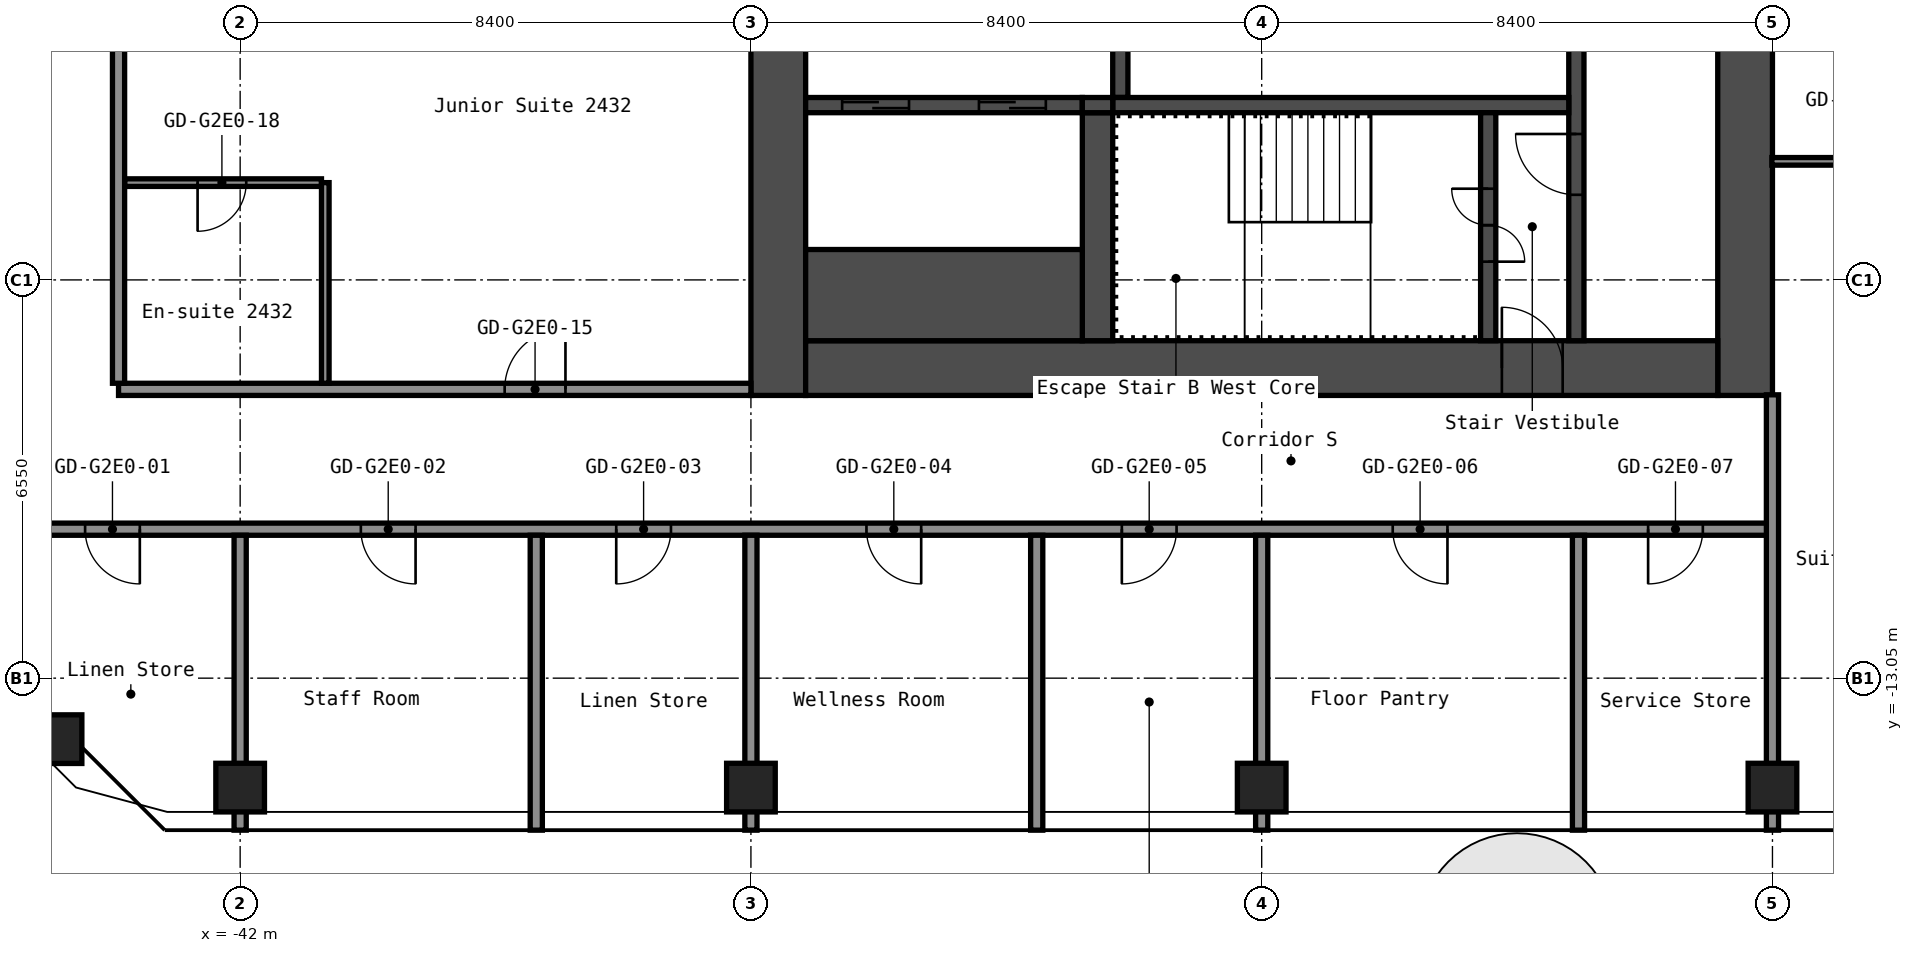
"""IFC4 building model, lengths in metres.
Left out: names, types, materials, properties, quantities, classifications, styles, units other than length and angle.
Written with IfcOpenShell. Run it as: python <this file> out.ifc"""

import sys

from ifc_helpers import new_model, si_unit, direction, frame, frame_2d, origin, origin_2d, place, context, subcontext, project, spatial, rectangle, hollow_rectangle, extrude, element, fill, save


model = new_model("IFC4")
c1 = context("Model", 3, precision=1e-05, world=origin(), true_north=direction((0.0, 1.0)))
c2 = subcontext(c1, "Body", "Model", "MODEL_VIEW")
j1 = project(units=[si_unit("LENGTHUNIT", "METRE"), si_unit("PLANEANGLEUNIT", "RADIAN")], contexts=[c1])
p1 = place(None, origin())
s1 = spatial("IfcSite", under=j1, at=p1, CompositionType="ELEMENT")
p2 = place(p1, origin())
s2 = spatial("IfcBuilding", under=s1, at=p2, CompositionType="ELEMENT")
p3 = place(p2, frame((0.0, 0.0, 88.2)))
s3 = spatial("IfcBuildingStorey", under=s2, at=p3, CompositionType="ELEMENT", Elevation=88.2)
for number, where, z_axis, x_axis in (
    (1, (-45.003, -14.053, 0.0), (0.0, 0.0, 1.0), (1.0, 0.0, 0.0)),
    (2, (-42.0, -14.85, 0.0), (0.0, 0.0, 1.0), (1.0, 0.0, 0.0)),
    (3, (-33.6, -14.85, 0.0), (0.0, 0.0, 1.0), (1.0, 0.0, 0.0)),
    (4, (-25.2, -14.85, 0.0), (0.0, 0.0, 1.0), (1.0, 0.0, 0.0)),
    (5, (-16.8, -14.85, 0.0), (0.0, 0.0, 1.0), (1.0, 0.0, 0.0)),
):
    element("IfcColumn", number, at=place(p3, frame(where, z_axis=z_axis, x_axis=x_axis)), inside=s3, PredefinedType="COLUMN", context=c2, shape_type="SweptSolid", body=[
        extrude(hollow_rectangle(XDim=0.8, YDim=0.8, WallThickness=0.032, at=origin_2d()), origin(), (0.0, 0.0, 1.0), 2.8),
    ])
p4 = place(p3, frame((-17.25, -8.4, 0.0), z_axis=(0.0, 0.0, 1.0), x_axis=(0.0, 1.0, 0.0)))
e6 = element("IfcWall", 6, at=p4, inside=s3, PredefinedType="SHEAR", context=c2, shape_type="SweptSolid", body=[
    extrude(rectangle(XDim=16.8, YDim=0.9, at=frame_2d((8.4, 0.0))), origin(), (0.0, 0.0, 1.0), 2.8),
])
p5 = place(p4, frame((7.6, 0.0, 0.0)))
e7 = element("IfcOpeningElement", 7, at=p5, cuts=e6, PredefinedType="OPENING", context=c2, shape_type="SweptSolid", body=[
    extrude(rectangle(XDim=1.2, YDim=2.1, at=frame_2d((0.6, 1.05))), frame((0.0, 0.46, 0.0), z_axis=(0.0, -1.0, 0.0), x_axis=(1.0, 0.0, 0.0)), (0.0, 0.0, 1.0), 0.92),
])
p6 = place(p3, frame((-33.15, -8.4, 0.0), z_axis=(0.0, 0.0, 1.0), x_axis=(0.0, 1.0, 0.0)))
e8 = element("IfcWall", 8, at=p6, inside=s3, PredefinedType="SHEAR", context=c2, shape_type="SweptSolid", body=[
    extrude(rectangle(XDim=16.8, YDim=0.9, at=frame_2d((8.4, 0.0))), origin(), (0.0, 0.0, 1.0), 2.8),
])
p7 = place(p3, frame((-32.7, -7.95, 0.0), z_axis=(0.0, 0.0, 1.0), x_axis=(1.0, 0.0, 0.0)))
e9 = element("IfcWall", 9, at=p7, inside=s3, PredefinedType="SHEAR", context=c2, shape_type="SweptSolid", body=[
    extrude(rectangle(XDim=15.0, YDim=0.9, at=frame_2d((7.5, 0.0))), origin(), (0.0, 0.0, 1.0), 2.8),
])
p8 = place(p7, frame((11.45, 0.0, 0.0)))
e10 = element("IfcOpeningElement", 10, at=p8, cuts=e9, PredefinedType="OPENING", context=c2, shape_type="SweptSolid", body=[
    extrude(rectangle(XDim=1.0, YDim=2.1, at=frame_2d((0.5, 1.05))), frame((0.0, 0.46, 0.0), z_axis=(0.0, -1.0, 0.0), x_axis=(1.0, 0.0, 0.0)), (0.0, 0.0, 1.0), 0.92),
])
p9 = place(p3, frame((-20.025, -7.5, 0.0), z_axis=(0.0, 0.0, 1.0), x_axis=(0.0, 1.0, 0.0)))
e11 = element("IfcWall", 11, at=p9, inside=s3, PredefinedType="SHEAR", context=c2, shape_type="SweptSolid", body=[
    extrude(rectangle(XDim=6.3, YDim=0.25, at=frame_2d((3.15, 0.0))), origin(), (0.0, 0.0, 1.0), 2.8),
])
p10 = place(p9, frame((2.4, 0.0, 0.0)))
e12 = element("IfcOpeningElement", 12, at=p10, cuts=e11, PredefinedType="OPENING", context=c2, shape_type="SweptSolid", body=[
    extrude(rectangle(XDim=1.0, YDim=2.1, at=frame_2d((0.5, 1.05))), frame((0.0, 0.135, 0.0), z_axis=(0.0, -1.0, 0.0), x_axis=(1.0, 0.0, 0.0)), (0.0, 0.0, 1.0), 0.27),
])
p11 = place(p3, frame((-27.525, -3.5, 0.0), z_axis=(0.0, 0.0, 1.0), x_axis=(0.0, 1.0, 0.0)))
e13 = element("IfcWall", 13, at=p11, inside=s3, PredefinedType="SHEAR", context=c2, shape_type="SweptSolid", body=[
    extrude(rectangle(XDim=2.05, YDim=0.25, at=frame_2d((1.025, 0.0))), origin(), (0.0, 0.0, 1.0), 2.8),
])
p12 = place(p3, frame((-27.65, -3.625, 0.0), z_axis=(0.0, 0.0, 1.0), x_axis=(1.0, 0.0, 0.0)))
e14 = element("IfcWall", 14, at=p12, inside=s3, PredefinedType="SHEAR", context=c2, shape_type="SweptSolid", body=[
    extrude(rectangle(XDim=7.5, YDim=0.25, at=frame_2d((3.75, 0.0))), origin(), (0.0, 0.0, 1.0), 2.8),
])
p13 = place(p3, frame((-21.475, -7.5, 0.0), z_axis=(0.0, 0.0, 1.0), x_axis=(0.0, 1.0, 0.0)))
e15 = element("IfcWall", 15, at=p13, inside=s3, PredefinedType="SHEAR", context=c2, shape_type="SweptSolid", body=[
    extrude(rectangle(XDim=3.75, YDim=0.25, at=frame_2d((1.875, 0.0))), origin(), (0.0, 0.0, 1.0), 2.8),
])
p14 = place(p13, frame((1.3, 0.0, 0.0)))
e16 = element("IfcOpeningElement", 16, at=p14, cuts=e15, PredefinedType="OPENING", context=c2, shape_type="SweptSolid", body=[
    extrude(rectangle(XDim=1.2, YDim=2.1, at=frame_2d((0.6, 1.05))), frame((0.0, 0.135, 0.0), z_axis=(0.0, -1.0, 0.0), x_axis=(1.0, 0.0, 0.0)), (0.0, 0.0, 1.0), 0.27),
])
p15 = place(p3, frame((-27.9, -7.5, 0.0), z_axis=(0.0, 0.0, 1.0), x_axis=(0.0, 1.0, 0.0)))
e17 = element("IfcWall", 17, at=p15, inside=s3, PredefinedType="SHEAR", context=c2, shape_type="SweptSolid", body=[
    extrude(rectangle(XDim=3.75, YDim=0.5, at=frame_2d((1.875, 0.0))), origin(), (0.0, 0.0, 1.0), 2.8),
])
p16 = place(p3, frame((-32.7, -3.625, 0.0), z_axis=(0.0, 0.0, 1.0), x_axis=(1.0, 0.0, 0.0)))
e18 = element("IfcWall", 18, at=p16, inside=s3, PredefinedType="SHEAR", context=c2, shape_type="SweptSolid", body=[
    extrude(rectangle(XDim=4.55, YDim=0.25, at=frame_2d((2.275, 0.0))), origin(), (0.0, 0.0, 1.0), 2.8),
])
p17 = place(p16, frame((2.85, 0.0, 0.0)))
e19 = element("IfcOpeningElement", 19, at=p17, cuts=e18, PredefinedType="OPENING", context=c2, shape_type="SweptSolid", body=[
    extrude(rectangle(XDim=1.1, YDim=2.1, at=frame_2d((0.55, 1.05))), frame((0.0, 0.135, 0.0), z_axis=(0.0, -1.0, 0.0), x_axis=(1.0, 0.0, 0.0)), (0.0, 0.0, 1.0), 0.27),
])
p18 = place(p16, frame((0.6, 0.0, 0.0)))
e20 = element("IfcOpeningElement", 20, at=p18, cuts=e18, PredefinedType="OPENING", context=c2, shape_type="SweptSolid", body=[
    extrude(rectangle(XDim=1.1, YDim=2.1, at=frame_2d((0.55, 1.05))), frame((0.0, 0.135, 0.0), z_axis=(0.0, -1.0, 0.0), x_axis=(1.0, 0.0, 0.0)), (0.0, 0.0, 1.0), 0.27),
])
p19 = place(p3, frame((-32.7, -6.75, 0.0), z_axis=(0.0, 0.0, 1.0), x_axis=(1.0, 0.0, 0.0)))
e21 = element("IfcWall", 21, at=p19, inside=s3, PredefinedType="SHEAR", context=c2, shape_type="SweptSolid", body=[
    extrude(rectangle(XDim=4.55, YDim=1.5, at=frame_2d((2.275, 0.0))), origin(), (0.0, 0.0, 1.0), 2.8),
])
p20 = place(p3, frame((-28.15, -3.625, 0.0), z_axis=(0.0, 0.0, 1.0), x_axis=(1.0, 0.0, 0.0)))
e22 = element("IfcWall", 22, at=p20, inside=s3, PredefinedType="SHEAR", context=c2, shape_type="SweptSolid", body=[
    extrude(rectangle(XDim=0.5, YDim=0.25, at=frame_2d((0.25, 0.0))), origin(), (0.0, 0.0, 1.0), 2.8),
])
p21 = place(p3, frame((-46.5, -10.6, 0.0), z_axis=(0.0, 0.0, 1.0), x_axis=(1.0, 0.0, 0.0)))
e23 = element("IfcWall", 23, at=p21, inside=s3, PredefinedType="PARTITIONING", context=c2, shape_type="SweptSolid", body=[
    extrude(rectangle(XDim=29.7, YDim=0.2, at=frame_2d((14.85, 0.0))), origin(), (0.0, 0.0, 1.0), 2.8),
])
p22 = place(p21, frame((1.95, 0.0, 0.0)))
e24 = element("IfcOpeningElement", 24, at=p22, cuts=e23, PredefinedType="OPENING", context=c2, shape_type="SweptSolid", body=[
    extrude(rectangle(XDim=0.9, YDim=2.1, at=frame_2d((0.45, 1.05))), frame((0.0, 0.11, 0.0), z_axis=(0.0, -1.0, 0.0), x_axis=(1.0, 0.0, 0.0)), (0.0, 0.0, 1.0), 0.22),
])
p23 = place(p21, frame((6.485, 0.0, 0.0)))
e25 = element("IfcOpeningElement", 25, at=p23, cuts=e23, PredefinedType="OPENING", context=c2, shape_type="SweptSolid", body=[
    extrude(rectangle(XDim=0.9, YDim=2.1, at=frame_2d((0.45, 1.05))), frame((0.0, 0.11, 0.0), z_axis=(0.0, -1.0, 0.0), x_axis=(1.0, 0.0, 0.0)), (0.0, 0.0, 1.0), 0.22),
])
p24 = place(p21, frame((10.685, 0.0, 0.0)))
e26 = element("IfcOpeningElement", 26, at=p24, cuts=e23, PredefinedType="OPENING", context=c2, shape_type="SweptSolid", body=[
    extrude(rectangle(XDim=0.9, YDim=2.1, at=frame_2d((0.45, 1.05))), frame((0.0, 0.11, 0.0), z_axis=(0.0, -1.0, 0.0), x_axis=(1.0, 0.0, 0.0)), (0.0, 0.0, 1.0), 0.22),
])
p25 = place(p21, frame((14.8, 0.0, 0.0)))
e27 = element("IfcOpeningElement", 27, at=p25, cuts=e23, PredefinedType="OPENING", context=c2, shape_type="SweptSolid", body=[
    extrude(rectangle(XDim=0.9, YDim=2.1, at=frame_2d((0.45, 1.05))), frame((0.0, 0.11, 0.0), z_axis=(0.0, -1.0, 0.0), x_axis=(1.0, 0.0, 0.0)), (0.0, 0.0, 1.0), 0.22),
])
p26 = place(p21, frame((19.0, 0.0, 0.0)))
e28 = element("IfcOpeningElement", 28, at=p26, cuts=e23, PredefinedType="OPENING", context=c2, shape_type="SweptSolid", body=[
    extrude(rectangle(XDim=0.9, YDim=2.1, at=frame_2d((0.45, 1.05))), frame((0.0, 0.11, 0.0), z_axis=(0.0, -1.0, 0.0), x_axis=(1.0, 0.0, 0.0)), (0.0, 0.0, 1.0), 0.22),
])
p27 = place(p21, frame((23.455, 0.0, 0.0)))
e29 = element("IfcOpeningElement", 29, at=p27, cuts=e23, PredefinedType="OPENING", context=c2, shape_type="SweptSolid", body=[
    extrude(rectangle(XDim=0.9, YDim=2.1, at=frame_2d((0.45, 1.05))), frame((0.0, 0.11, 0.0), z_axis=(0.0, -1.0, 0.0), x_axis=(1.0, 0.0, 0.0)), (0.0, 0.0, 1.0), 0.22),
])
p28 = place(p21, frame((27.655, 0.0, 0.0)))
e30 = element("IfcOpeningElement", 30, at=p28, cuts=e23, PredefinedType="OPENING", context=c2, shape_type="SweptSolid", body=[
    extrude(rectangle(XDim=0.9, YDim=2.1, at=frame_2d((0.45, 1.05))), frame((0.0, 0.11, 0.0), z_axis=(0.0, -1.0, 0.0), x_axis=(1.0, 0.0, 0.0)), (0.0, 0.0, 1.0), 0.22),
])
p29 = place(p3, frame((-44.0, -8.3, 0.0), z_axis=(0.0, 0.0, 1.0), x_axis=(1.0, 0.0, 0.0)))
e31 = element("IfcWall", 31, at=p29, inside=s3, PredefinedType="PARTITIONING", context=c2, shape_type="SweptSolid", body=[
    extrude(rectangle(XDim=10.4, YDim=0.2, at=frame_2d((5.2, 0.0))), origin(), (0.0, 0.0, 1.0), 2.8),
])
p30 = place(p29, frame((6.35, 0.0, 0.0)))
e32 = element("IfcOpeningElement", 32, at=p30, cuts=e31, PredefinedType="OPENING", context=c2, shape_type="SweptSolid", body=[
    extrude(rectangle(XDim=1.0, YDim=2.1, at=frame_2d((0.5, 1.05))), frame((0.0, 0.11, 0.0), z_axis=(0.0, -1.0, 0.0), x_axis=(1.0, 0.0, 0.0)), (0.0, 0.0, 1.0), 0.22),
])
p31 = place(p3, frame((-43.9, -4.9, 0.0), z_axis=(0.0, 0.0, 1.0), x_axis=(1.0, 0.0, 0.0)))
e33 = element("IfcWall", 33, at=p31, inside=s3, PredefinedType="PARTITIONING", context=c2, shape_type="SweptSolid", body=[
    extrude(rectangle(XDim=3.237, YDim=0.125, at=frame_2d((1.619, 0.0))), origin(), (0.0, 0.0, 1.0), 2.8),
])
p32 = place(p31, frame((1.2, 0.0, 0.0)))
e34 = element("IfcOpeningElement", 34, at=p32, cuts=e33, PredefinedType="OPENING", context=c2, shape_type="SweptSolid", body=[
    extrude(rectangle(XDim=0.8, YDim=2.1, at=frame_2d((0.4, 1.05))), frame((0.0, 0.073, 0.0), z_axis=(0.0, -1.0, 0.0), x_axis=(1.0, 0.0, 0.0)), (0.0, 0.0, 1.0), 0.145),
])
p33 = place(p3, frame((-16.81, -4.55, 0.0), z_axis=(0.0, 0.0, 1.0), x_axis=(1.0, 0.0, 0.0)))
e35 = element("IfcWall", 35, at=p33, inside=s3, PredefinedType="PARTITIONING", context=c2, shape_type="SweptSolid", body=[
    extrude(rectangle(XDim=2.948, YDim=0.125, at=frame_2d((1.474, 0.0))), origin(), (0.0, 0.0, 1.0), 2.8),
])
p34 = place(p33, frame((1.11, 0.0, 0.0)))
e36 = element("IfcOpeningElement", 36, at=p34, cuts=e35, PredefinedType="OPENING", context=c2, shape_type="SweptSolid", body=[
    extrude(rectangle(XDim=0.8, YDim=2.1, at=frame_2d((0.4, 1.05))), frame((0.0, 0.073, 0.0), z_axis=(0.0, -1.0, 0.0), x_axis=(1.0, 0.0, 0.0)), (0.0, 0.0, 1.0), 0.145),
])
p35 = place(p3, frame((-44.0, -8.2, 0.0), z_axis=(0.0, 0.0, 1.0), x_axis=(0.0, 1.0, 0.0)))
e37 = element("IfcWall", 37, at=p35, inside=s3, PredefinedType="PARTITIONING", context=c2, shape_type="SweptSolid", body=[
    extrude(rectangle(XDim=16.4, YDim=0.2, at=frame_2d((8.2, 0.0))), origin(), (0.0, 0.0, 1.0), 2.8),
])
p36 = place(p3, frame((-42.0, -15.55, 0.0), z_axis=(0.0, 0.0, 1.0), x_axis=(0.0, 1.0, 0.0)))
e38 = element("IfcWall", 38, at=p36, inside=s3, PredefinedType="PARTITIONING", context=c2, shape_type="SweptSolid", body=[
    extrude(rectangle(XDim=4.85, YDim=0.2, at=frame_2d((2.425, 0.0))), origin(), (0.0, 0.0, 1.0), 2.8),
])
p37 = place(p3, frame((-40.6, -8.2, 0.0), z_axis=(0.0, 0.0, 1.0), x_axis=(0.0, 1.0, 0.0)))
e39 = element("IfcWall", 39, at=p37, inside=s3, PredefinedType="PARTITIONING", context=c2, shape_type="SweptSolid", body=[
    extrude(rectangle(XDim=3.3, YDim=0.125, at=frame_2d((1.65, 0.0))), origin(), (0.0, 0.0, 1.0), 2.8),
])
for number, where, z_axis, x_axis in (
    (40, (-37.13, -15.55, 0.0), (0.0, 0.0, 1.0), (0.0, 1.0, 0.0)),
    (41, (-33.6, -15.55, 0.0), (0.0, 0.0, 1.0), (0.0, 1.0, 0.0)),
    (42, (-28.9, -15.55, 0.0), (0.0, 0.0, 1.0), (0.0, 1.0, 0.0)),
    (43, (-25.2, -15.55, 0.0), (0.0, 0.0, 1.0), (0.0, 1.0, 0.0)),
    (44, (-19.99, -15.55, 0.0), (0.0, 0.0, 1.0), (0.0, 1.0, 0.0)),
):
    element("IfcWall", number, at=place(p3, frame(where, z_axis=z_axis, x_axis=x_axis)), inside=s3, PredefinedType="PARTITIONING", context=c2, shape_type="SweptSolid", body=[
        extrude(rectangle(XDim=4.85, YDim=0.2, at=frame_2d((2.425, 0.0))), origin(), (0.0, 0.0, 1.0), 2.8),
    ])
p38 = place(p3, frame((-16.8, -15.55, 0.0), z_axis=(0.0, 0.0, 1.0), x_axis=(0.0, 1.0, 0.0)))
e45 = element("IfcWall", 45, at=p38, inside=s3, PredefinedType="PARTITIONING", context=c2, shape_type="SweptSolid", body=[
    extrude(rectangle(XDim=7.16, YDim=0.2, at=frame_2d((3.58, 0.0))), origin(), (0.0, 0.0, 1.0), 2.8),
])
p39 = place(p8, origin())
e46 = element("IfcDoor", 46, at=p39, inside=s3, OperationType="SINGLE_SWING_RIGHT", PredefinedType="DOOR", context=c2, shape_type="SweptSolid", body=[
    extrude(rectangle(XDim=1.0, YDim=2.1, at=frame_2d((0.5, 1.05))), frame((0.0, 0.025, 0.0), z_axis=(0.0, -1.0, 0.0), x_axis=(1.0, 0.0, 0.0)), (0.0, 0.0, 1.0), 0.05),
])
fill(e10, e46)
p40 = place(p14, origin())
e47 = element("IfcDoor", 47, at=p40, inside=s3, OperationType="DOUBLE_DOOR_SINGLE_SWING", PredefinedType="DOOR", context=c2, shape_type="SweptSolid", body=[
    extrude(rectangle(XDim=1.2, YDim=2.1, at=frame_2d((0.6, 1.05))), frame((0.0, 0.025, 0.0), z_axis=(0.0, -1.0, 0.0), x_axis=(1.0, 0.0, 0.0)), (0.0, 0.0, 1.0), 0.05),
])
fill(e16, e47)
p41 = place(p10, origin())
e48 = element("IfcDoor", 48, at=p41, inside=s3, OperationType="SINGLE_SWING_LEFT", PredefinedType="DOOR", context=c2, shape_type="SweptSolid", body=[
    extrude(rectangle(XDim=1.0, YDim=2.1, at=frame_2d((0.5, 1.05))), frame((0.0, 0.025, 0.0), z_axis=(0.0, -1.0, 0.0), x_axis=(1.0, 0.0, 0.0)), (0.0, 0.0, 1.0), 0.05),
])
fill(e12, e48)
p42 = place(p17, origin())
e49 = element("IfcDoor", 49, at=p42, inside=s3, OperationType="DOUBLE_DOOR_SLIDING", PredefinedType="DOOR", context=c2, shape_type="SweptSolid", body=[
    extrude(rectangle(XDim=1.1, YDim=2.1, at=frame_2d((0.55, 1.05))), frame((0.0, 0.025, 0.0), z_axis=(0.0, -1.0, 0.0), x_axis=(1.0, 0.0, 0.0)), (0.0, 0.0, 1.0), 0.05),
])
fill(e19, e49)
p43 = place(p18, origin())
e50 = element("IfcDoor", 50, at=p43, inside=s3, OperationType="DOUBLE_DOOR_SLIDING", PredefinedType="DOOR", context=c2, shape_type="SweptSolid", body=[
    extrude(rectangle(XDim=1.1, YDim=2.1, at=frame_2d((0.55, 1.05))), frame((0.0, 0.025, 0.0), z_axis=(0.0, -1.0, 0.0), x_axis=(1.0, 0.0, 0.0)), (0.0, 0.0, 1.0), 0.05),
])
fill(e20, e50)
p44 = place(p22, origin())
e51 = element("IfcDoor", 51, at=p44, inside=s3, OperationType="SINGLE_SWING_RIGHT", PredefinedType="DOOR", context=c2, shape_type="SweptSolid", body=[
    extrude(rectangle(XDim=0.9, YDim=2.1, at=frame_2d((0.45, 1.05))), frame((0.0, 0.025, 0.0), z_axis=(0.0, -1.0, 0.0), x_axis=(1.0, 0.0, 0.0)), (0.0, 0.0, 1.0), 0.05),
])
fill(e24, e51)
p45 = place(p23, origin())
e52 = element("IfcDoor", 52, at=p45, inside=s3, OperationType="SINGLE_SWING_RIGHT", PredefinedType="DOOR", context=c2, shape_type="SweptSolid", body=[
    extrude(rectangle(XDim=0.9, YDim=2.1, at=frame_2d((0.45, 1.05))), frame((0.0, 0.025, 0.0), z_axis=(0.0, -1.0, 0.0), x_axis=(1.0, 0.0, 0.0)), (0.0, 0.0, 1.0), 0.05),
])
fill(e25, e52)
p46 = place(p24, origin())
e53 = element("IfcDoor", 53, at=p46, inside=s3, OperationType="SINGLE_SWING_LEFT", PredefinedType="DOOR", context=c2, shape_type="SweptSolid", body=[
    extrude(rectangle(XDim=0.9, YDim=2.1, at=frame_2d((0.45, 1.05))), frame((0.0, 0.025, 0.0), z_axis=(0.0, -1.0, 0.0), x_axis=(1.0, 0.0, 0.0)), (0.0, 0.0, 1.0), 0.05),
])
fill(e26, e53)
p47 = place(p25, origin())
e54 = element("IfcDoor", 54, at=p47, inside=s3, OperationType="SINGLE_SWING_RIGHT", PredefinedType="DOOR", context=c2, shape_type="SweptSolid", body=[
    extrude(rectangle(XDim=0.9, YDim=2.1, at=frame_2d((0.45, 1.05))), frame((0.0, 0.025, 0.0), z_axis=(0.0, -1.0, 0.0), x_axis=(1.0, 0.0, 0.0)), (0.0, 0.0, 1.0), 0.05),
])
fill(e27, e54)
p48 = place(p26, origin())
e55 = element("IfcDoor", 55, at=p48, inside=s3, OperationType="SINGLE_SWING_LEFT", PredefinedType="DOOR", context=c2, shape_type="SweptSolid", body=[
    extrude(rectangle(XDim=0.9, YDim=2.1, at=frame_2d((0.45, 1.05))), frame((0.0, 0.025, 0.0), z_axis=(0.0, -1.0, 0.0), x_axis=(1.0, 0.0, 0.0)), (0.0, 0.0, 1.0), 0.05),
])
fill(e28, e55)
p49 = place(p27, origin())
e56 = element("IfcDoor", 56, at=p49, inside=s3, OperationType="SINGLE_SWING_RIGHT", PredefinedType="DOOR", context=c2, shape_type="SweptSolid", body=[
    extrude(rectangle(XDim=0.9, YDim=2.1, at=frame_2d((0.45, 1.05))), frame((0.0, 0.025, 0.0), z_axis=(0.0, -1.0, 0.0), x_axis=(1.0, 0.0, 0.0)), (0.0, 0.0, 1.0), 0.05),
])
fill(e29, e56)
p50 = place(p28, origin())
e57 = element("IfcDoor", 57, at=p50, inside=s3, OperationType="SINGLE_SWING_LEFT", PredefinedType="DOOR", context=c2, shape_type="SweptSolid", body=[
    extrude(rectangle(XDim=0.9, YDim=2.1, at=frame_2d((0.45, 1.05))), frame((0.0, 0.025, 0.0), z_axis=(0.0, -1.0, 0.0), x_axis=(1.0, 0.0, 0.0)), (0.0, 0.0, 1.0), 0.05),
])
fill(e30, e57)
p51 = place(p30, origin())
e58 = element("IfcDoor", 58, at=p51, inside=s3, OperationType="SINGLE_SWING_LEFT", PredefinedType="DOOR", context=c2, shape_type="SweptSolid", body=[
    extrude(rectangle(XDim=1.0, YDim=2.1, at=frame_2d((0.5, 1.05))), frame((0.0, 0.025, 0.0), z_axis=(0.0, -1.0, 0.0), x_axis=(1.0, 0.0, 0.0)), (0.0, 0.0, 1.0), 0.05),
])
fill(e32, e58)
p52 = place(p32, origin())
e59 = element("IfcDoor", 59, at=p52, inside=s3, OperationType="SINGLE_SWING_LEFT", PredefinedType="DOOR", context=c2, shape_type="SweptSolid", body=[
    extrude(rectangle(XDim=0.8, YDim=2.1, at=frame_2d((0.4, 1.05))), frame((0.0, 0.025, 0.0), z_axis=(0.0, -1.0, 0.0), x_axis=(1.0, 0.0, 0.0)), (0.0, 0.0, 1.0), 0.05),
])
fill(e34, e59)
save(model, sys.argv[1])
